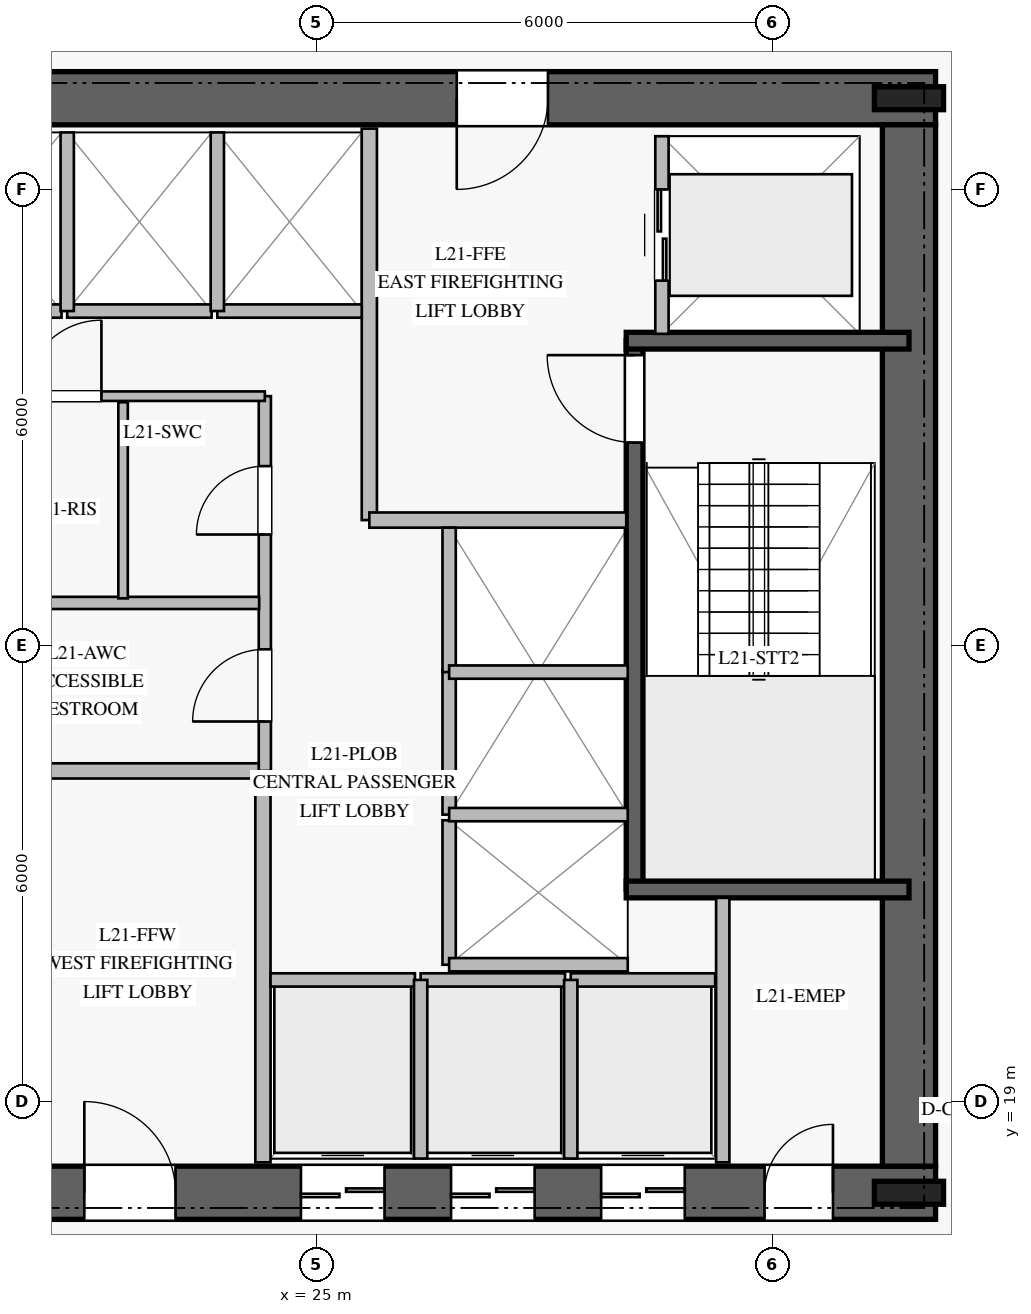
"""IFC4 building model, lengths in metres.
Left out: names, types, materials, properties, quantities, classifications, styles, units other than length and angle.
Written with IfcOpenShell. Run it as: python <this file> out.ifc"""

import sys

from ifc_helpers import new_model, si_unit, direction, frame, frame_2d, origin, origin_2d, place, context, subcontext, project, spatial, rectangle, i_section, extrude, element, fill, save


model = new_model("IFC4")
c1 = context("Model", 3, precision=1e-05, world=origin(), true_north=direction((0.0, 1.0)))
c2 = subcontext(c1, "Body", "Model", "MODEL_VIEW")
j1 = project(units=[si_unit("LENGTHUNIT", "METRE"), si_unit("PLANEANGLEUNIT", "RADIAN")], contexts=[c1])
p1 = place(None, origin())
s1 = spatial("IfcSite", under=j1, at=p1, CompositionType="ELEMENT")
p2 = place(p1, origin())
s2 = spatial("IfcBuilding", under=s1, at=p2, CompositionType="ELEMENT")
p3 = place(p2, frame((0.0, 0.0, 88.0)))
s3 = spatial("IfcBuildingStorey", under=s2, at=p3, CompositionType="ELEMENT", Elevation=88.0)
p4 = place(p3, frame((16.85, 17.8, 0.0), z_axis=(0.0, 0.0, 1.0), x_axis=(1.0, 0.0, 0.0)))
e1 = element("IfcWall", 1, at=p4, inside=s3, PredefinedType="SHEAR", context=c2, shape_type="SweptSolid", body=[
    extrude(rectangle(XDim=16.3, YDim=0.7, at=frame_2d((8.15, 0.0))), origin(), (0.0, 0.0, 1.0), 3.7),
])
p5 = place(p4, frame((5.1, 0.0, 0.0)))
e2 = element("IfcOpeningElement", 2, at=p5, cuts=e1, PredefinedType="OPENING", context=c2, shape_type="SweptSolid", body=[
    extrude(rectangle(XDim=1.2, YDim=2.25, at=frame_2d((0.6, 1.125))), frame((0.0, 0.36, 0.0), z_axis=(0.0, -1.0, 0.0), x_axis=(1.0, 0.0, 0.0)), (0.0, 0.0, 1.0), 0.72),
])
p6 = place(p4, frame((14.05, 0.0, 0.0)))
e3 = element("IfcOpeningElement", 3, at=p6, cuts=e1, PredefinedType="OPENING", context=c2, shape_type="SweptSolid", body=[
    extrude(rectangle(XDim=0.9, YDim=2.1, at=frame_2d((0.45, 1.05))), frame((0.0, 0.36, 0.0), z_axis=(0.0, -1.0, 0.0), x_axis=(1.0, 0.0, 0.0)), (0.0, 0.0, 1.0), 0.72),
])
p7 = place(p4, frame((7.95, 0.0, 0.0)))
e4 = element("IfcOpeningElement", 4, at=p7, cuts=e1, PredefinedType="OPENING", context=c2, shape_type="SweptSolid", body=[
    extrude(rectangle(XDim=1.1, YDim=2.2, at=frame_2d((0.55, 1.1))), frame((0.0, 0.36, 0.0), z_axis=(0.0, -1.0, 0.0), x_axis=(1.0, 0.0, 0.0)), (0.0, 0.0, 1.0), 0.72),
])
p8 = place(p4, frame((9.925, 0.0, 0.0)))
e5 = element("IfcOpeningElement", 5, at=p8, cuts=e1, PredefinedType="OPENING", context=c2, shape_type="SweptSolid", body=[
    extrude(rectangle(XDim=1.1, YDim=2.2, at=frame_2d((0.55, 1.1))), frame((0.0, 0.36, 0.0), z_axis=(0.0, -1.0, 0.0), x_axis=(1.0, 0.0, 0.0)), (0.0, 0.0, 1.0), 0.72),
])
p9 = place(p4, frame((11.9, 0.0, 0.0)))
e6 = element("IfcOpeningElement", 6, at=p9, cuts=e1, PredefinedType="OPENING", context=c2, shape_type="SweptSolid", body=[
    extrude(rectangle(XDim=1.1, YDim=2.2, at=frame_2d((0.55, 1.1))), frame((0.0, 0.36, 0.0), z_axis=(0.0, -1.0, 0.0), x_axis=(1.0, 0.0, 0.0)), (0.0, 0.0, 1.0), 0.72),
])
p10 = place(p3, frame((33.15, 32.2, 0.0), z_axis=(0.0, 0.0, 1.0), x_axis=(-1.0, 0.0, 0.0)))
e7 = element("IfcWall", 7, at=p10, inside=s3, PredefinedType="SHEAR", context=c2, shape_type="SweptSolid", body=[
    extrude(rectangle(XDim=16.3, YDim=0.7, at=frame_2d((8.15, 0.0))), origin(), (0.0, 0.0, 1.0), 3.7),
])
p11 = place(p10, frame((5.1, 0.0, 0.0)))
e8 = element("IfcOpeningElement", 8, at=p11, cuts=e7, PredefinedType="OPENING", context=c2, shape_type="SweptSolid", body=[
    extrude(rectangle(XDim=1.2, YDim=2.25, at=frame_2d((0.6, 1.125))), frame((0.0, 0.36, 0.0), z_axis=(0.0, -1.0, 0.0), x_axis=(1.0, 0.0, 0.0)), (0.0, 0.0, 1.0), 0.72),
])
p12 = place(p3, frame((32.8, 18.15, 0.0), z_axis=(0.0, 0.0, 1.0), x_axis=(0.0, 1.0, 0.0)))
e9 = element("IfcWall", 9, at=p12, inside=s3, PredefinedType="SHEAR", context=c2, shape_type="SweptSolid", body=[
    extrude(rectangle(XDim=13.7, YDim=0.7, at=frame_2d((6.85, 0.0))), origin(), (0.0, 0.0, 1.0), 3.7),
])
for number, where, z_axis, x_axis in (
    (10, (32.8, 17.8, 0.0), (0.0, 0.0, 1.0), (1.0, 0.0, 0.0)),
    (11, (32.8, 32.2, 0.0), (0.0, 0.0, 1.0), (1.0, 0.0, 0.0)),
):
    element("IfcColumn", number, at=place(p3, frame(where, z_axis=z_axis, x_axis=x_axis)), inside=s3, PredefinedType="COLUMN", context=c2, shape_type="SweptSolid", body=[
        extrude(i_section(OverallWidth=0.302, OverallDepth=0.91, WebThickness=0.021, FlangeThickness=0.04, at=origin_2d()), origin(), (0.0, 0.0, 1.0), 4.0),
    ])
p13 = place(p3, frame((29.19, 21.79, 0.0), z_axis=(0.0, 0.0, 1.0), x_axis=(0.0, 1.0, 0.0)))
e12 = element("IfcWall", 12, at=p13, inside=s3, PredefinedType="SOLIDWALL", context=c2, shape_type="SweptSolid", body=[
    extrude(rectangle(XDim=7.22, YDim=0.22, at=frame_2d((3.61, 0.0))), origin(), (0.0, 0.0, 1.0), 3.7),
])
p14 = place(p13, frame((5.88, 0.0, 0.0)))
e13 = element("IfcOpeningElement", 13, at=p14, cuts=e12, PredefinedType="OPENING", context=c2, shape_type="SweptSolid", body=[
    extrude(rectangle(XDim=1.15, YDim=2.2, at=frame_2d((0.575, 1.1))), frame((0.0, 0.12, 0.0), z_axis=(0.0, -1.0, 0.0), x_axis=(1.0, 0.0, 0.0)), (0.0, 0.0, 1.0), 0.24),
])
for number, where, z_axis, x_axis in (
    (14, (29.08, 21.79, 0.0), (0.0, 0.0, 1.0), (1.0, 0.0, 0.0)),
    (15, (29.08, 29.01, 0.0), (0.0, 0.0, 1.0), (1.0, 0.0, 0.0)),
):
    element("IfcWall", number, at=place(p3, frame(where, z_axis=z_axis, x_axis=x_axis)), inside=s3, PredefinedType="SOLIDWALL", context=c2, shape_type="SweptSolid", body=[
        extrude(rectangle(XDim=3.72, YDim=0.22, at=frame_2d((1.86, 0.0))), origin(), (0.0, 0.0, 1.0), 3.7),
    ])
p15 = place(p3, frame((24.3, 18.2, 0.0), z_axis=(0.0, 0.0, 1.0), x_axis=(0.0, 1.0, 0.0)))
e16 = element("IfcWall", 16, at=p15, inside=s3, PredefinedType="PARTITIONING", context=c2, shape_type="SweptSolid", body=[
    extrude(rectangle(XDim=5.15, YDim=0.2, at=frame_2d((2.575, 0.0))), origin(), (0.0, 0.0, 1.0), 3.7),
])
p16 = place(p3, frame((20.92, 23.35, 0.0), z_axis=(0.0, 0.0, 1.0), x_axis=(1.0, 0.0, 0.0)))
e17 = element("IfcWall", 17, at=p16, inside=s3, PredefinedType="PARTITIONING", context=c2, shape_type="SweptSolid", body=[
    extrude(rectangle(XDim=3.38, YDim=0.2, at=frame_2d((1.69, 0.0))), origin(), (0.0, 0.0, 1.0), 3.7),
])
p17 = place(p3, frame((25.7, 26.65, 0.0), z_axis=(0.0, 0.0, 1.0), x_axis=(0.0, 1.0, 0.0)))
e18 = element("IfcWall", 18, at=p17, inside=s3, PredefinedType="PARTITIONING", context=c2, shape_type="SweptSolid", body=[
    extrude(rectangle(XDim=5.15, YDim=0.2, at=frame_2d((2.575, 0.0))), origin(), (0.0, 0.0, 1.0), 3.7),
])
p18 = place(p3, frame((25.7, 26.65, 0.0), z_axis=(0.0, 0.0, 1.0), x_axis=(1.0, 0.0, 0.0)))
e19 = element("IfcWall", 19, at=p18, inside=s3, PredefinedType="PARTITIONING", context=c2, shape_type="SweptSolid", body=[
    extrude(rectangle(XDim=3.38, YDim=0.2, at=frame_2d((1.69, 0.0))), origin(), (0.0, 0.0, 1.0), 3.7),
])
p19 = place(p3, frame((24.325, 23.35, 0.0), z_axis=(0.0, 0.0, 1.0), x_axis=(0.0, 1.0, 0.0)))
e20 = element("IfcWall", 20, at=p19, inside=s3, PredefinedType="PLUMBINGWALL", context=c2, shape_type="SweptSolid", body=[
    extrude(rectangle(XDim=4.93, YDim=0.16, at=frame_2d((2.465, 0.0))), origin(), (0.0, 0.0, 1.0), 3.7),
])
p20 = place(p19, frame((0.65, 0.0, 0.0)))
e21 = element("IfcOpeningElement", 21, at=p20, cuts=e20, PredefinedType="OPENING", context=c2, shape_type="SweptSolid", body=[
    extrude(rectangle(XDim=0.95, YDim=2.1, at=frame_2d((0.475, 1.05))), frame((0.0, 0.09, 0.0), z_axis=(0.0, -1.0, 0.0), x_axis=(1.0, 0.0, 0.0)), (0.0, 0.0, 1.0), 0.18),
])
p21 = place(p19, frame((3.11, 0.0, 0.0)))
e22 = element("IfcOpeningElement", 22, at=p21, cuts=e20, PredefinedType="OPENING", context=c2, shape_type="SweptSolid", body=[
    extrude(rectangle(XDim=0.9, YDim=2.1, at=frame_2d((0.45, 1.05))), frame((0.0, 0.09, 0.0), z_axis=(0.0, -1.0, 0.0), x_axis=(1.0, 0.0, 0.0)), (0.0, 0.0, 1.0), 0.18),
])
p22 = place(p3, frame((20.92, 28.28, 0.0), z_axis=(0.0, 0.0, 1.0), x_axis=(1.0, 0.0, 0.0)))
e23 = element("IfcWall", 23, at=p22, inside=s3, PredefinedType="PARTITIONING", context=c2, shape_type="SweptSolid", body=[
    extrude(rectangle(XDim=3.405, YDim=0.125, at=frame_2d((1.703, 0.0))), origin(), (0.0, 0.0, 1.0), 3.7),
])
p23 = place(p22, frame((0.255, 0.0, 0.0)))
e24 = element("IfcOpeningElement", 24, at=p23, cuts=e23, PredefinedType="OPENING", context=c2, shape_type="SweptSolid", body=[
    extrude(rectangle(XDim=1.0, YDim=2.15, at=frame_2d((0.5, 1.075))), frame((0.0, 0.073, 0.0), z_axis=(0.0, -1.0, 0.0), x_axis=(1.0, 0.0, 0.0)), (0.0, 0.0, 1.0), 0.145),
])
p24 = place(p3, frame((20.95, 25.56, 0.0), z_axis=(0.0, 0.0, 1.0), x_axis=(1.0, 0.0, 0.0)))
e25 = element("IfcWall", 25, at=p24, inside=s3, PredefinedType="PLUMBINGWALL", context=c2, shape_type="SweptSolid", body=[
    extrude(rectangle(XDim=3.3, YDim=0.16, at=frame_2d((1.65, 0.0))), origin(), (0.0, 0.0, 1.0), 3.7),
])
p25 = place(p3, frame((22.46, 25.62, 0.0), z_axis=(0.0, 0.0, 1.0), x_axis=(0.0, 1.0, 0.0)))
e26 = element("IfcWall", 26, at=p25, inside=s3, PredefinedType="PARTITIONING", context=c2, shape_type="SweptSolid", body=[
    extrude(rectangle(XDim=2.58, YDim=0.125, at=frame_2d((1.29, 0.0))), origin(), (0.0, 0.0, 1.0), 3.7),
])
p26 = place(p3, frame((30.35, 18.2, 0.0), z_axis=(0.0, 0.0, 1.0), x_axis=(0.0, 1.0, 0.0)))
e27 = element("IfcWall", 27, at=p26, inside=s3, PredefinedType="PARTITIONING", context=c2, shape_type="SweptSolid", body=[
    extrude(rectangle(XDim=3.48, YDim=0.175, at=frame_2d((1.74, 0.0))), origin(), (0.0, 0.0, 1.0), 3.7),
])
p27 = place(p3, frame((24.4, 20.6, 0.0), z_axis=(0.0, 0.0, 1.0), x_axis=(1.0, 0.0, 0.0)))
e28 = element("IfcWall", 28, at=p27, inside=s3, PredefinedType="PARTITIONING", context=c2, shape_type="SweptSolid", body=[
    extrude(rectangle(XDim=1.9, YDim=0.175, at=frame_2d((0.95, 0.0))), origin(), (0.0, 0.0, 1.0), 3.7),
])
p28 = place(p3, frame((26.375, 20.6, 0.0), z_axis=(0.0, 0.0, 1.0), x_axis=(1.0, 0.0, 0.0)))
e29 = element("IfcWall", 29, at=p28, inside=s3, PredefinedType="PARTITIONING", context=c2, shape_type="SweptSolid", body=[
    extrude(rectangle(XDim=1.9, YDim=0.175, at=frame_2d((0.95, 0.0))), origin(), (0.0, 0.0, 1.0), 3.7),
])
p29 = place(p3, frame((26.375, 18.25, 0.0), z_axis=(0.0, 0.0, 1.0), x_axis=(0.0, 1.0, 0.0)))
e30 = element("IfcWall", 30, at=p29, inside=s3, PredefinedType="PARTITIONING", context=c2, shape_type="SweptSolid", body=[
    extrude(rectangle(XDim=2.35, YDim=0.175, at=frame_2d((1.175, 0.0))), origin(), (0.0, 0.0, 1.0), 3.7),
])
p30 = place(p3, frame((28.35, 20.6, 0.0), z_axis=(0.0, 0.0, 1.0), x_axis=(1.0, 0.0, 0.0)))
e31 = element("IfcWall", 31, at=p30, inside=s3, PredefinedType="PARTITIONING", context=c2, shape_type="SweptSolid", body=[
    extrude(rectangle(XDim=1.9, YDim=0.175, at=frame_2d((0.95, 0.0))), origin(), (0.0, 0.0, 1.0), 3.7),
])
p31 = place(p3, frame((28.35, 18.25, 0.0), z_axis=(0.0, 0.0, 1.0), x_axis=(0.0, 1.0, 0.0)))
e32 = element("IfcWall", 32, at=p31, inside=s3, PredefinedType="PARTITIONING", context=c2, shape_type="SweptSolid", body=[
    extrude(rectangle(XDim=2.35, YDim=0.175, at=frame_2d((1.175, 0.0))), origin(), (0.0, 0.0, 1.0), 3.7),
])
for number, where, z_axis, x_axis in (
    (33, (19.75, 29.4, 0.0), (0.0, 0.0, 1.0), (1.0, 0.0, 0.0)),
    (34, (21.725, 29.4, 0.0), (0.0, 0.0, 1.0), (1.0, 0.0, 0.0)),
):
    element("IfcWall", number, at=place(p3, frame(where, z_axis=z_axis, x_axis=x_axis)), inside=s3, PredefinedType="PARTITIONING", context=c2, shape_type="SweptSolid", body=[
        extrude(rectangle(XDim=1.9, YDim=0.175, at=frame_2d((0.95, 0.0))), origin(), (0.0, 0.0, 1.0), 3.7),
    ])
p32 = place(p3, frame((21.725, 29.4, 0.0), z_axis=(0.0, 0.0, 1.0), x_axis=(0.0, 1.0, 0.0)))
e35 = element("IfcWall", 35, at=p32, inside=s3, PredefinedType="PARTITIONING", context=c2, shape_type="SweptSolid", body=[
    extrude(rectangle(XDim=2.35, YDim=0.175, at=frame_2d((1.175, 0.0))), origin(), (0.0, 0.0, 1.0), 3.7),
])
p33 = place(p3, frame((23.7, 29.4, 0.0), z_axis=(0.0, 0.0, 1.0), x_axis=(1.0, 0.0, 0.0)))
e36 = element("IfcWall", 36, at=p33, inside=s3, PredefinedType="PARTITIONING", context=c2, shape_type="SweptSolid", body=[
    extrude(rectangle(XDim=1.9, YDim=0.175, at=frame_2d((0.95, 0.0))), origin(), (0.0, 0.0, 1.0), 3.7),
])
p34 = place(p3, frame((23.7, 29.4, 0.0), z_axis=(0.0, 0.0, 1.0), x_axis=(0.0, 1.0, 0.0)))
e37 = element("IfcWall", 37, at=p34, inside=s3, PredefinedType="PARTITIONING", context=c2, shape_type="SweptSolid", body=[
    extrude(rectangle(XDim=2.35, YDim=0.175, at=frame_2d((1.175, 0.0))), origin(), (0.0, 0.0, 1.0), 3.7),
])
p35 = place(p3, frame((26.75, 20.8, 0.0), z_axis=(0.0, 0.0, 1.0), x_axis=(0.0, 1.0, 0.0)))
e38 = element("IfcWall", 38, at=p35, inside=s3, PredefinedType="PARTITIONING", context=c2, shape_type="SweptSolid", body=[
    extrude(rectangle(XDim=1.9, YDim=0.175, at=frame_2d((0.95, 0.0))), origin(), (0.0, 0.0, 1.0), 3.7),
])
p36 = place(p3, frame((26.75, 20.8, 0.0), z_axis=(0.0, 0.0, 1.0), x_axis=(1.0, 0.0, 0.0)))
e39 = element("IfcWall", 39, at=p36, inside=s3, PredefinedType="PARTITIONING", context=c2, shape_type="SweptSolid", body=[
    extrude(rectangle(XDim=2.35, YDim=0.175, at=frame_2d((1.175, 0.0))), origin(), (0.0, 0.0, 1.0), 3.7),
])
p37 = place(p3, frame((26.75, 22.775, 0.0), z_axis=(0.0, 0.0, 1.0), x_axis=(0.0, 1.0, 0.0)))
e40 = element("IfcWall", 40, at=p37, inside=s3, PredefinedType="PARTITIONING", context=c2, shape_type="SweptSolid", body=[
    extrude(rectangle(XDim=1.9, YDim=0.175, at=frame_2d((0.95, 0.0))), origin(), (0.0, 0.0, 1.0), 3.7),
])
p38 = place(p3, frame((26.75, 22.775, 0.0), z_axis=(0.0, 0.0, 1.0), x_axis=(1.0, 0.0, 0.0)))
e41 = element("IfcWall", 41, at=p38, inside=s3, PredefinedType="PARTITIONING", context=c2, shape_type="SweptSolid", body=[
    extrude(rectangle(XDim=2.35, YDim=0.175, at=frame_2d((1.175, 0.0))), origin(), (0.0, 0.0, 1.0), 3.7),
])
p39 = place(p3, frame((26.75, 24.65, 0.0), z_axis=(0.0, 0.0, 1.0), x_axis=(0.0, 1.0, 0.0)))
e42 = element("IfcWall", 42, at=p39, inside=s3, PredefinedType="PARTITIONING", context=c2, shape_type="SweptSolid", body=[
    extrude(rectangle(XDim=1.9, YDim=0.175, at=frame_2d((0.95, 0.0))), origin(), (0.0, 0.0, 1.0), 3.7),
])
p40 = place(p3, frame((26.75, 24.65, 0.0), z_axis=(0.0, 0.0, 1.0), x_axis=(1.0, 0.0, 0.0)))
e43 = element("IfcWall", 43, at=p40, inside=s3, PredefinedType="PARTITIONING", context=c2, shape_type="SweptSolid", body=[
    extrude(rectangle(XDim=2.35, YDim=0.175, at=frame_2d((1.175, 0.0))), origin(), (0.0, 0.0, 1.0), 3.7),
])
p41 = place(p3, frame((29.55, 29.1, 0.0), z_axis=(0.0, 0.0, 1.0), x_axis=(0.0, 1.0, 0.0)))
e44 = element("IfcWall", 44, at=p41, inside=s3, PredefinedType="PARTITIONING", context=c2, shape_type="SweptSolid", body=[
    extrude(rectangle(XDim=2.6, YDim=0.175, at=frame_2d((1.3, 0.0))), origin(), (0.0, 0.0, 1.0), 3.7),
])
p42 = place(p41, frame((0.7, 0.0, 0.0)))
e45 = element("IfcOpeningElement", 45, at=p42, cuts=e44, PredefinedType="OPENING", context=c2, shape_type="SweptSolid", body=[
    extrude(rectangle(XDim=1.2, YDim=2.2, at=frame_2d((0.6, 1.1))), frame((0.0, 0.098, 0.0), z_axis=(0.0, -1.0, 0.0), x_axis=(1.0, 0.0, 0.0)), (0.0, 0.0, 1.0), 0.195),
])
p43 = place(p14, origin())
e46 = element("IfcDoor", 46, at=p43, inside=s3, OperationType="SINGLE_SWING_RIGHT", PredefinedType="DOOR", context=c2, shape_type="SweptSolid", body=[
    extrude(rectangle(XDim=1.15, YDim=2.2, at=frame_2d((0.575, 1.1))), frame((0.0, 0.025, 0.0), z_axis=(0.0, -1.0, 0.0), x_axis=(1.0, 0.0, 0.0)), (0.0, 0.0, 1.0), 0.05),
])
fill(e13, e46)
p44 = place(p5, origin())
e47 = element("IfcDoor", 47, at=p44, inside=s3, OperationType="SINGLE_SWING_LEFT", PredefinedType="DOOR", context=c2, shape_type="SweptSolid", body=[
    extrude(rectangle(XDim=1.2, YDim=2.25, at=frame_2d((0.6, 1.125))), frame((0.0, 0.025, 0.0), z_axis=(0.0, -1.0, 0.0), x_axis=(1.0, 0.0, 0.0)), (0.0, 0.0, 1.0), 0.05),
])
fill(e2, e47)
p45 = place(p11, origin())
e48 = element("IfcDoor", 48, at=p45, inside=s3, OperationType="SINGLE_SWING_RIGHT", PredefinedType="DOOR", context=c2, shape_type="SweptSolid", body=[
    extrude(rectangle(XDim=1.2, YDim=2.25, at=frame_2d((0.6, 1.125))), frame((0.0, 0.025, 0.0), z_axis=(0.0, -1.0, 0.0), x_axis=(1.0, 0.0, 0.0)), (0.0, 0.0, 1.0), 0.05),
])
fill(e8, e48)
p46 = place(p20, origin())
e49 = element("IfcDoor", 49, at=p46, inside=s3, OperationType="SINGLE_SWING_LEFT", PredefinedType="DOOR", context=c2, shape_type="SweptSolid", body=[
    extrude(rectangle(XDim=0.95, YDim=2.1, at=frame_2d((0.475, 1.05))), frame((0.0, 0.025, 0.0), z_axis=(0.0, -1.0, 0.0), x_axis=(1.0, 0.0, 0.0)), (0.0, 0.0, 1.0), 0.05),
])
fill(e21, e49)
p47 = place(p23, origin())
e50 = element("IfcDoor", 50, at=p47, inside=s3, OperationType="SINGLE_SWING_RIGHT", PredefinedType="DOOR", context=c2, shape_type="SweptSolid", body=[
    extrude(rectangle(XDim=1.0, YDim=2.15, at=frame_2d((0.5, 1.075))), frame((0.0, 0.025, 0.0), z_axis=(0.0, -1.0, 0.0), x_axis=(1.0, 0.0, 0.0)), (0.0, 0.0, 1.0), 0.05),
])
fill(e24, e50)
p48 = place(p21, origin())
e51 = element("IfcDoor", 51, at=p48, inside=s3, OperationType="SINGLE_SWING_LEFT", PredefinedType="DOOR", context=c2, shape_type="SweptSolid", body=[
    extrude(rectangle(XDim=0.9, YDim=2.1, at=frame_2d((0.45, 1.05))), frame((0.0, 0.025, 0.0), z_axis=(0.0, -1.0, 0.0), x_axis=(1.0, 0.0, 0.0)), (0.0, 0.0, 1.0), 0.05),
])
fill(e22, e51)
p49 = place(p6, origin())
e52 = element("IfcDoor", 52, at=p49, inside=s3, OperationType="SINGLE_SWING_RIGHT", PredefinedType="DOOR", context=c2, shape_type="SweptSolid", body=[
    extrude(rectangle(XDim=0.9, YDim=2.1, at=frame_2d((0.45, 1.05))), frame((0.0, 0.025, 0.0), z_axis=(0.0, -1.0, 0.0), x_axis=(1.0, 0.0, 0.0)), (0.0, 0.0, 1.0), 0.05),
])
fill(e3, e52)
p50 = place(p7, origin())
e53 = element("IfcDoor", 53, at=p50, inside=s3, OperationType="DOUBLE_DOOR_SLIDING", PredefinedType="DOOR", context=c2, shape_type="SweptSolid", body=[
    extrude(rectangle(XDim=1.1, YDim=2.2, at=frame_2d((0.55, 1.1))), frame((0.0, 0.025, 0.0), z_axis=(0.0, -1.0, 0.0), x_axis=(1.0, 0.0, 0.0)), (0.0, 0.0, 1.0), 0.05),
])
fill(e4, e53)
p51 = place(p8, origin())
e54 = element("IfcDoor", 54, at=p51, inside=s3, OperationType="DOUBLE_DOOR_SLIDING", PredefinedType="DOOR", context=c2, shape_type="SweptSolid", body=[
    extrude(rectangle(XDim=1.1, YDim=2.2, at=frame_2d((0.55, 1.1))), frame((0.0, 0.025, 0.0), z_axis=(0.0, -1.0, 0.0), x_axis=(1.0, 0.0, 0.0)), (0.0, 0.0, 1.0), 0.05),
])
fill(e5, e54)
p52 = place(p9, origin())
e55 = element("IfcDoor", 55, at=p52, inside=s3, OperationType="DOUBLE_DOOR_SLIDING", PredefinedType="DOOR", context=c2, shape_type="SweptSolid", body=[
    extrude(rectangle(XDim=1.1, YDim=2.2, at=frame_2d((0.55, 1.1))), frame((0.0, 0.025, 0.0), z_axis=(0.0, -1.0, 0.0), x_axis=(1.0, 0.0, 0.0)), (0.0, 0.0, 1.0), 0.05),
])
fill(e6, e55)
p53 = place(p42, origin())
e56 = element("IfcDoor", 56, at=p53, inside=s3, OperationType="DOUBLE_DOOR_SLIDING", PredefinedType="DOOR", context=c2, shape_type="SweptSolid", body=[
    extrude(rectangle(XDim=1.2, YDim=2.2, at=frame_2d((0.6, 1.1))), frame((0.0, 0.025, 0.0), z_axis=(0.0, -1.0, 0.0), x_axis=(1.0, 0.0, 0.0)), (0.0, 0.0, 1.0), 0.05),
])
fill(e45, e56)
save(model, sys.argv[1])
